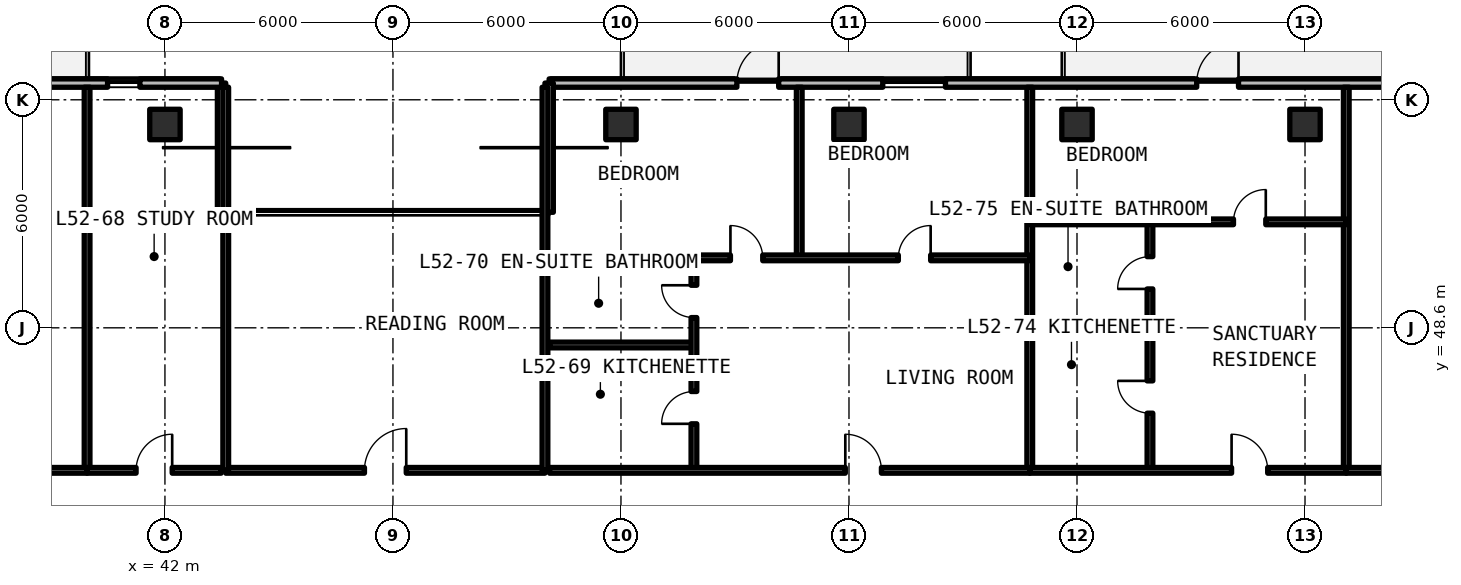
"""IFC4 building model, lengths in metres.
Left out: names, types, materials, properties, quantities, classifications, styles, units other than length and angle.
Written with IfcOpenShell. Run it as: python <this file> out.ifc"""

import sys

from ifc_helpers import new_model, si_unit, direction, frame, frame_2d, origin, origin_2d, place, context, subcontext, project, spatial, rectangle, extrude, element, fill, save


model = new_model("IFC4")
c1 = context("Model", 3, precision=1e-05, world=origin(), true_north=direction((0.0, 1.0)))
c2 = subcontext(c1, "Body", "Model", "MODEL_VIEW")
j1 = project(units=[si_unit("LENGTHUNIT", "METRE"), si_unit("PLANEANGLEUNIT", "RADIAN")], contexts=[c1])
p1 = place(None, origin())
s1 = spatial("IfcSite", under=j1, at=p1, CompositionType="ELEMENT")
p2 = place(p1, origin())
s2 = spatial("IfcBuilding", under=s1, at=p2, CompositionType="ELEMENT")
p3 = place(p2, frame((0.0, 0.0, 188.43)))
s3 = spatial("IfcBuildingStorey", under=s2, at=p3, CompositionType="ELEMENT", Elevation=188.43)
for number, where, z_axis, x_axis in (
    (1, (42.0, 53.95, 0.0), (0.0, 0.0, 1.0), (1.0, 0.0, 0.0)),
    (2, (54.0, 53.95, 0.0), (0.0, 0.0, 1.0), (1.0, 0.0, 0.0)),
    (3, (60.0, 53.95, 0.0), (0.0, 0.0, 1.0), (1.0, 0.0, 0.0)),
    (4, (66.0, 53.95, 0.0), (0.0, 0.0, 1.0), (1.0, 0.0, 0.0)),
    (5, (72.0, 53.95, 0.0), (0.0, 0.0, 1.0), (1.0, 0.0, 0.0)),
):
    element("IfcColumn", number, at=place(p3, frame(where, z_axis=z_axis, x_axis=x_axis)), inside=s3, PredefinedType="COLUMN", context=c2, shape_type="SweptSolid", body=[
        extrude(rectangle(XDim=0.8, YDim=0.8, at=origin_2d()), origin(), (0.0, 0.0, 1.0), 3.3),
    ])
p4 = place(p3, frame((95.354, 55.04, 0.0), z_axis=(0.0, 0.0, 1.0), x_axis=(-1.0, 0.0, 0.0)))
e6 = element("IfcWall", 6, at=p4, inside=s3, PredefinedType="SOLIDWALL", context=c2, shape_type="SweptSolid", body=[
    extrude(rectangle(XDim=43.244, YDim=0.22, at=frame_2d((21.622, 0.0))), origin(), (0.0, 0.0, 1.0), 3.08),
])
p5 = place(p4, frame((37.204, 0.0, 0.0)))
e7 = element("IfcOpeningElement", 7, at=p5, cuts=e6, PredefinedType="OPENING", context=c2, shape_type="SweptSolid", body=[
    extrude(rectangle(XDim=1.1, YDim=2.15, at=frame_2d((0.55, 1.075))), frame((0.0, 0.12, 0.0), z_axis=(0.0, -1.0, 0.0), x_axis=(1.0, 0.0, 0.0)), (0.0, 0.0, 1.0), 0.24),
])
p6 = place(p4, frame((25.104, 0.0, 0.0)))
e8 = element("IfcOpeningElement", 8, at=p6, cuts=e6, PredefinedType="OPENING", context=c2, shape_type="SweptSolid", body=[
    extrude(rectangle(XDim=1.1, YDim=2.15, at=frame_2d((0.55, 1.075))), frame((0.0, 0.12, 0.0), z_axis=(0.0, -1.0, 0.0), x_axis=(1.0, 0.0, 0.0)), (0.0, 0.0, 1.0), 0.24),
])
p7 = place(p4, frame((13.254, 0.0, 0.0)))
e9 = element("IfcOpeningElement", 9, at=p7, cuts=e6, PredefinedType="OPENING", context=c2, shape_type="SweptSolid", body=[
    extrude(rectangle(XDim=1.1, YDim=2.15, at=frame_2d((0.55, 1.075))), frame((0.0, 0.12, 0.0), z_axis=(0.0, -1.0, 0.0), x_axis=(1.0, 0.0, 0.0)), (0.0, 0.0, 1.0), 0.24),
])
p8 = place(p4, frame((32.815, 0.0, 0.78)))
e10 = element("IfcOpeningElement", 10, at=p8, cuts=e6, PredefinedType="OPENING", context=c2, shape_type="SweptSolid", body=[
    extrude(rectangle(XDim=1.65, YDim=1.66, at=frame_2d((0.825, 0.83))), frame((0.0, 0.12, 0.0), z_axis=(0.0, -1.0, 0.0), x_axis=(1.0, 0.0, 0.0)), (0.0, 0.0, 1.0), 0.24),
])
p9 = place(p4, frame((8.458, 0.0, 0.78)))
e11 = element("IfcOpeningElement", 11, at=p9, cuts=e6, PredefinedType="OPENING", context=c2, shape_type="SweptSolid", body=[
    extrude(rectangle(XDim=1.65, YDim=1.66, at=frame_2d((0.825, 0.83))), frame((0.0, 0.12, 0.0), z_axis=(0.0, -1.0, 0.0), x_axis=(1.0, 0.0, 0.0)), (0.0, 0.0, 1.0), 0.24),
])
p10 = place(p4, frame((2.303, 0.0, 0.78)))
e12 = element("IfcOpeningElement", 12, at=p10, cuts=e6, PredefinedType="OPENING", context=c2, shape_type="SweptSolid", body=[
    extrude(rectangle(XDim=1.65, YDim=1.66, at=frame_2d((0.825, 0.83))), frame((0.0, 0.12, 0.0), z_axis=(0.0, -1.0, 0.0), x_axis=(1.0, 0.0, 0.0)), (0.0, 0.0, 1.0), 0.24),
])
for number, where, z_axis, x_axis in (
    (13, (52.11, 55.04, 0.0), (0.0, 0.0, 1.0), (0.0, -1.0, 0.0)),
    (14, (43.49, 51.64, 0.0), (0.0, 0.0, 1.0), (0.0, 1.0, 0.0)),
):
    element("IfcWall", number, at=place(p3, frame(where, z_axis=z_axis, x_axis=x_axis)), inside=s3, PredefinedType="SOLIDWALL", context=c2, shape_type="SweptSolid", body=[
        extrude(rectangle(XDim=3.4, YDim=0.22, at=frame_2d((1.7, 0.0))), origin(), (0.0, 0.0, 1.0), 3.08),
    ])
p11 = place(p3, frame((43.49, 55.04, 0.0), z_axis=(0.0, 0.0, 1.0), x_axis=(-1.0, 0.0, 0.0)))
e15 = element("IfcWall", 15, at=p11, inside=s3, PredefinedType="SOLIDWALL", context=c2, shape_type="SweptSolid", body=[
    extrude(rectangle(XDim=17.644, YDim=0.22, at=frame_2d((8.822, 0.0))), origin(), (0.0, 0.0, 1.0), 3.08),
])
p12 = place(p11, frame((10.29, 0.0, 0.0)))
e16 = element("IfcOpeningElement", 16, at=p12, cuts=e15, PredefinedType="OPENING", context=c2, shape_type="SweptSolid", body=[
    extrude(rectangle(XDim=1.1, YDim=2.15, at=frame_2d((0.55, 1.075))), frame((0.0, 0.12, 0.0), z_axis=(0.0, -1.0, 0.0), x_axis=(1.0, 0.0, 0.0)), (0.0, 0.0, 1.0), 0.24),
])
p13 = place(p11, frame((14.901, 0.0, 0.78)))
e17 = element("IfcOpeningElement", 17, at=p13, cuts=e15, PredefinedType="OPENING", context=c2, shape_type="SweptSolid", body=[
    extrude(rectangle(XDim=1.65, YDim=1.66, at=frame_2d((0.825, 0.83))), frame((0.0, 0.12, 0.0), z_axis=(0.0, -1.0, 0.0), x_axis=(1.0, 0.0, 0.0)), (0.0, 0.0, 1.0), 0.24),
])
p14 = place(p11, frame((4.969, 0.0, 0.78)))
e18 = element("IfcOpeningElement", 18, at=p14, cuts=e15, PredefinedType="OPENING", context=c2, shape_type="SweptSolid", body=[
    extrude(rectangle(XDim=1.65, YDim=1.66, at=frame_2d((0.825, 0.83))), frame((0.0, 0.12, 0.0), z_axis=(0.0, -1.0, 0.0), x_axis=(1.0, 0.0, 0.0)), (0.0, 0.0, 1.0), 0.24),
])
p15 = place(p11, frame((2.149, 0.0, 0.78)))
e19 = element("IfcOpeningElement", 19, at=p15, cuts=e15, PredefinedType="OPENING", context=c2, shape_type="SweptSolid", body=[
    extrude(rectangle(XDim=0.85, YDim=1.65, at=frame_2d((0.425, 0.825))), frame((0.0, 0.12, 0.0), z_axis=(0.0, -1.0, 0.0), x_axis=(1.0, 0.0, 0.0)), (0.0, 0.0, 1.0), 0.24),
])
p16 = place(p3, frame((43.6, 44.85, 0.0), z_axis=(0.0, 0.0, 1.0), x_axis=(1.0, 0.0, 0.0)))
e20 = element("IfcWall", 20, at=p16, inside=s3, PredefinedType="SOLIDWALL", context=c2, shape_type="SweptSolid", body=[
    extrude(rectangle(XDim=8.4, YDim=0.15, at=frame_2d((4.2, 0.0))), origin(), (0.0, 0.0, 1.0), 2.35),
])
p17 = place(p16, frame((3.65, 0.0, 0.0)))
e21 = element("IfcOpeningElement", 21, at=p17, cuts=e20, PredefinedType="OPENING", context=c2, shape_type="SweptSolid", body=[
    extrude(rectangle(XDim=1.1, YDim=2.15, at=frame_2d((0.55, 1.075))), frame((0.0, 0.085, 0.0), z_axis=(0.0, -1.0, 0.0), x_axis=(1.0, 0.0, 0.0)), (0.0, 0.0, 1.0), 0.17),
])
for number, where, z_axis, x_axis in (
    (22, (43.6, 44.85, 0.0), (0.0, 0.0, 1.0), (0.0, 1.0, 0.0)),
    (23, (52.0, 44.85, 0.0), (0.0, 0.0, 1.0), (0.0, 1.0, 0.0)),
    (24, (39.951, 44.85, 0.0), (0.0, 0.0, 1.0), (0.0, 1.0, 0.0)),
):
    element("IfcWall", number, at=place(p3, frame(where, z_axis=z_axis, x_axis=x_axis)), inside=s3, PredefinedType="SOLIDWALL", context=c2, shape_type="SweptSolid", body=[
        extrude(rectangle(XDim=10.08, YDim=0.15, at=frame_2d((5.04, 0.0))), origin(), (0.0, 0.0, 1.0), 2.35),
    ])
p18 = place(p3, frame((33.842, 44.85, 0.0), z_axis=(0.0, 0.0, 1.0), x_axis=(1.0, 0.0, 0.0)))
e25 = element("IfcWall", 25, at=p18, inside=s3, PredefinedType="SOLIDWALL", context=c2, shape_type="SweptSolid", body=[
    extrude(rectangle(XDim=6.11, YDim=0.15, at=frame_2d((3.055, 0.0))), origin(), (0.0, 0.0, 1.0), 2.35),
])
p19 = place(p18, frame((2.58, 0.0, 0.0)))
e26 = element("IfcOpeningElement", 26, at=p19, cuts=e25, PredefinedType="OPENING", context=c2, shape_type="SweptSolid", body=[
    extrude(rectangle(XDim=0.95, YDim=2.15, at=frame_2d((0.475, 1.075))), frame((0.0, 0.085, 0.0), z_axis=(0.0, -1.0, 0.0), x_axis=(1.0, 0.0, 0.0)), (0.0, 0.0, 1.0), 0.17),
])
p20 = place(p3, frame((39.951, 44.85, 0.0), z_axis=(0.0, 0.0, 1.0), x_axis=(1.0, 0.0, 0.0)))
e27 = element("IfcWall", 27, at=p20, inside=s3, PredefinedType="SOLIDWALL", context=c2, shape_type="SweptSolid", body=[
    extrude(rectangle(XDim=3.529, YDim=0.15, at=frame_2d((1.764, 0.0))), origin(), (0.0, 0.0, 1.0), 2.35),
])
p21 = place(p20, frame((1.289, 0.0, 0.0)))
e28 = element("IfcOpeningElement", 28, at=p21, cuts=e27, PredefinedType="OPENING", context=c2, shape_type="SweptSolid", body=[
    extrude(rectangle(XDim=0.95, YDim=2.15, at=frame_2d((0.475, 1.075))), frame((0.0, 0.085, 0.0), z_axis=(0.0, -1.0, 0.0), x_axis=(1.0, 0.0, 0.0)), (0.0, 0.0, 1.0), 0.17),
])
p22 = place(p3, frame((64.757, 44.85, 0.0), z_axis=(0.0, 0.0, 1.0), x_axis=(0.0, 1.0, 0.0)))
e29 = element("IfcWall", 29, at=p22, inside=s3, PredefinedType="SOLIDWALL", context=c2, shape_type="SweptSolid", body=[
    extrude(rectangle(XDim=10.08, YDim=0.15, at=frame_2d((5.04, 0.0))), origin(), (0.0, 0.0, 1.0), 2.35),
])
p23 = place(p3, frame((52.12, 48.148, 0.0), z_axis=(0.0, 0.0, 1.0), x_axis=(1.0, 0.0, 0.0)))
e30 = element("IfcWall", 30, at=p23, inside=s3, PredefinedType="PARTITIONING", context=c2, shape_type="SweptSolid", body=[
    extrude(rectangle(XDim=3.8, YDim=0.15, at=frame_2d((1.9, 0.0))), origin(), (0.0, 0.0, 1.0), 2.35),
])
p24 = place(p3, frame((55.92, 44.85, 0.0), z_axis=(0.0, 0.0, 1.0), x_axis=(0.0, 1.0, 0.0)))
e31 = element("IfcWall", 31, at=p24, inside=s3, PredefinedType="PARTITIONING", context=c2, shape_type="SweptSolid", body=[
    extrude(rectangle(XDim=5.591, YDim=0.15, at=frame_2d((2.795, 0.0))), origin(), (0.0, 0.0, 1.0), 2.35),
])
p25 = place(p24, frame((1.224, 0.0, 0.0)))
e32 = element("IfcOpeningElement", 32, at=p25, cuts=e31, PredefinedType="OPENING", context=c2, shape_type="SweptSolid", body=[
    extrude(rectangle(XDim=0.85, YDim=2.1, at=frame_2d((0.425, 1.05))), frame((0.0, 0.085, 0.0), z_axis=(0.0, -1.0, 0.0), x_axis=(1.0, 0.0, 0.0)), (0.0, 0.0, 1.0), 0.17),
])
p26 = place(p24, frame((4.02, 0.0, 0.0)))
e33 = element("IfcOpeningElement", 33, at=p26, cuts=e31, PredefinedType="OPENING", context=c2, shape_type="SweptSolid", body=[
    extrude(rectangle(XDim=0.85, YDim=2.1, at=frame_2d((0.425, 1.05))), frame((0.0, 0.085, 0.0), z_axis=(0.0, -1.0, 0.0), x_axis=(1.0, 0.0, 0.0)), (0.0, 0.0, 1.0), 0.17),
])
p27 = place(p3, frame((58.691, 50.441, 0.0), z_axis=(0.0, 0.0, 1.0), x_axis=(0.0, 1.0, 0.0)))
e34 = element("IfcWall", 34, at=p27, inside=s3, PredefinedType="PARTITIONING", context=c2, shape_type="SweptSolid", body=[
    extrude(rectangle(XDim=4.489, YDim=0.15, at=frame_2d((2.245, 0.0))), origin(), (0.0, 0.0, 1.0), 2.35),
])
p28 = place(p3, frame((52.12, 50.441, 0.0), z_axis=(0.0, 0.0, 1.0), x_axis=(1.0, 0.0, 0.0)))
e35 = element("IfcWall", 35, at=p28, inside=s3, PredefinedType="PARTITIONING", context=c2, shape_type="SweptSolid", body=[
    extrude(rectangle(XDim=12.637, YDim=0.15, at=frame_2d((6.318, 0.0))), origin(), (0.0, 0.0, 1.0), 2.35),
])
p29 = place(p28, frame((4.76, 0.0, 0.0)))
e36 = element("IfcOpeningElement", 36, at=p29, cuts=e35, PredefinedType="OPENING", context=c2, shape_type="SweptSolid", body=[
    extrude(rectangle(XDim=0.85, YDim=2.1, at=frame_2d((0.425, 1.05))), frame((0.0, 0.085, 0.0), z_axis=(0.0, -1.0, 0.0), x_axis=(1.0, 0.0, 0.0)), (0.0, 0.0, 1.0), 0.17),
])
p30 = place(p28, frame((9.179, 0.0, 0.0)))
e37 = element("IfcOpeningElement", 37, at=p30, cuts=e35, PredefinedType="OPENING", context=c2, shape_type="SweptSolid", body=[
    extrude(rectangle(XDim=0.85, YDim=2.1, at=frame_2d((0.425, 1.05))), frame((0.0, 0.085, 0.0), z_axis=(0.0, -1.0, 0.0), x_axis=(1.0, 0.0, 0.0)), (0.0, 0.0, 1.0), 0.17),
])
p31 = place(p3, frame((52.12, 44.85, 0.0), z_axis=(0.0, 0.0, 1.0), x_axis=(1.0, 0.0, 0.0)))
e38 = element("IfcWall", 38, at=p31, inside=s3, PredefinedType="SOLIDWALL", context=c2, shape_type="SweptSolid", body=[
    extrude(rectangle(XDim=12.637, YDim=0.15, at=frame_2d((6.318, 0.0))), origin(), (0.0, 0.0, 1.0), 2.35),
])
p32 = place(p31, frame((7.783, 0.0, 0.0)))
e39 = element("IfcOpeningElement", 39, at=p32, cuts=e38, PredefinedType="OPENING", context=c2, shape_type="SweptSolid", body=[
    extrude(rectangle(XDim=0.95, YDim=2.15, at=frame_2d((0.475, 1.075))), frame((0.0, 0.085, 0.0), z_axis=(0.0, -1.0, 0.0), x_axis=(1.0, 0.0, 0.0)), (0.0, 0.0, 1.0), 0.17),
])
p33 = place(p3, frame((73.086, 44.85, 0.0), z_axis=(0.0, 0.0, 1.0), x_axis=(0.0, 1.0, 0.0)))
e40 = element("IfcWall", 40, at=p33, inside=s3, PredefinedType="SOLIDWALL", context=c2, shape_type="SweptSolid", body=[
    extrude(rectangle(XDim=10.08, YDim=0.15, at=frame_2d((5.04, 0.0))), origin(), (0.0, 0.0, 1.0), 2.35),
])
p34 = place(p3, frame((64.757, 48.708, 0.0), z_axis=(0.0, 0.0, 1.0), x_axis=(1.0, 0.0, 0.0)))
e41 = element("IfcWall", 41, at=p34, inside=s3, PredefinedType="PARTITIONING", context=c2, shape_type="SweptSolid", body=[
    extrude(rectangle(XDim=3.163, YDim=0.15, at=frame_2d((1.582, 0.0))), origin(), (0.0, 0.0, 1.0), 2.35),
])
p35 = place(p3, frame((67.92, 44.85, 0.0), z_axis=(0.0, 0.0, 1.0), x_axis=(0.0, 1.0, 0.0)))
e42 = element("IfcWall", 42, at=p35, inside=s3, PredefinedType="PARTITIONING", context=c2, shape_type="SweptSolid", body=[
    extrude(rectangle(XDim=6.538, YDim=0.15, at=frame_2d((3.269, 0.0))), origin(), (0.0, 0.0, 1.0), 2.35),
])
p36 = place(p35, frame((1.504, 0.0, 0.0)))
e43 = element("IfcOpeningElement", 43, at=p36, cuts=e42, PredefinedType="OPENING", context=c2, shape_type="SweptSolid", body=[
    extrude(rectangle(XDim=0.85, YDim=2.1, at=frame_2d((0.425, 1.05))), frame((0.0, 0.085, 0.0), z_axis=(0.0, -1.0, 0.0), x_axis=(1.0, 0.0, 0.0)), (0.0, 0.0, 1.0), 0.17),
])
p37 = place(p35, frame((4.773, 0.0, 0.0)))
e44 = element("IfcOpeningElement", 44, at=p37, cuts=e42, PredefinedType="OPENING", context=c2, shape_type="SweptSolid", body=[
    extrude(rectangle(XDim=0.85, YDim=2.1, at=frame_2d((0.425, 1.05))), frame((0.0, 0.085, 0.0), z_axis=(0.0, -1.0, 0.0), x_axis=(1.0, 0.0, 0.0)), (0.0, 0.0, 1.0), 0.17),
])
p38 = place(p3, frame((64.757, 51.388, 0.0), z_axis=(0.0, 0.0, 1.0), x_axis=(1.0, 0.0, 0.0)))
e45 = element("IfcWall", 45, at=p38, inside=s3, PredefinedType="PARTITIONING", context=c2, shape_type="SweptSolid", body=[
    extrude(rectangle(XDim=8.329, YDim=0.15, at=frame_2d((4.165, 0.0))), origin(), (0.0, 0.0, 1.0), 2.35),
])
p39 = place(p38, frame((5.361, 0.0, 0.0)))
e46 = element("IfcOpeningElement", 46, at=p39, cuts=e45, PredefinedType="OPENING", context=c2, shape_type="SweptSolid", body=[
    extrude(rectangle(XDim=0.85, YDim=2.1, at=frame_2d((0.425, 1.05))), frame((0.0, 0.085, 0.0), z_axis=(0.0, -1.0, 0.0), x_axis=(1.0, 0.0, 0.0)), (0.0, 0.0, 1.0), 0.17),
])
p40 = place(p3, frame((64.757, 44.85, 0.0), z_axis=(0.0, 0.0, 1.0), x_axis=(1.0, 0.0, 0.0)))
e47 = element("IfcWall", 47, at=p40, inside=s3, PredefinedType="SOLIDWALL", context=c2, shape_type="SweptSolid", body=[
    extrude(rectangle(XDim=8.329, YDim=0.15, at=frame_2d((4.165, 0.0))), origin(), (0.0, 0.0, 1.0), 2.35),
])
p41 = place(p40, frame((5.311, 0.0, 0.0)))
e48 = element("IfcOpeningElement", 48, at=p41, cuts=e47, PredefinedType="OPENING", context=c2, shape_type="SweptSolid", body=[
    extrude(rectangle(XDim=0.95, YDim=2.15, at=frame_2d((0.475, 1.075))), frame((0.0, 0.085, 0.0), z_axis=(0.0, -1.0, 0.0), x_axis=(1.0, 0.0, 0.0)), (0.0, 0.0, 1.0), 0.17),
])
p42 = place(p3, frame((73.086, 44.85, 0.0), z_axis=(0.0, 0.0, 1.0), x_axis=(1.0, 0.0, 0.0)))
e49 = element("IfcWall", 49, at=p42, inside=s3, PredefinedType="SOLIDWALL", context=c2, shape_type="SweptSolid", body=[
    extrude(rectangle(XDim=9.765, YDim=0.15, at=frame_2d((4.882, 0.0))), origin(), (0.0, 0.0, 1.0), 2.35),
])
p43 = place(p42, frame((4.333, 0.0, 0.0)))
e50 = element("IfcOpeningElement", 50, at=p43, cuts=e49, PredefinedType="OPENING", context=c2, shape_type="SweptSolid", body=[
    extrude(rectangle(XDim=1.1, YDim=2.15, at=frame_2d((0.55, 1.075))), frame((0.0, 0.085, 0.0), z_axis=(0.0, -1.0, 0.0), x_axis=(1.0, 0.0, 0.0)), (0.0, 0.0, 1.0), 0.17),
])
p44 = place(p5, frame((1.1, 0.0, 0.0), z_axis=(0.0, 0.0, 1.0), x_axis=(-1.0, 0.0, 0.0)))
e51 = element("IfcDoor", 51, at=p44, inside=s3, OperationType="SINGLE_SWING_RIGHT", PredefinedType="DOOR", context=c2, shape_type="SweptSolid", body=[
    extrude(rectangle(XDim=1.1, YDim=2.15, at=frame_2d((0.55, 1.075))), frame((0.0, 0.025, 0.0), z_axis=(0.0, -1.0, 0.0), x_axis=(1.0, 0.0, 0.0)), (0.0, 0.0, 1.0), 0.05),
])
fill(e7, e51)
p45 = place(p6, frame((1.1, 0.0, 0.0), z_axis=(0.0, 0.0, 1.0), x_axis=(-1.0, 0.0, 0.0)))
e52 = element("IfcDoor", 52, at=p45, inside=s3, OperationType="SINGLE_SWING_LEFT", PredefinedType="DOOR", context=c2, shape_type="SweptSolid", body=[
    extrude(rectangle(XDim=1.1, YDim=2.15, at=frame_2d((0.55, 1.075))), frame((0.0, 0.025, 0.0), z_axis=(0.0, -1.0, 0.0), x_axis=(1.0, 0.0, 0.0)), (0.0, 0.0, 1.0), 0.05),
])
fill(e8, e52)
p46 = place(p8, origin())
e53 = element("IfcWindow", 53, at=p46, inside=s3, PartitioningType="SINGLE_PANEL", PredefinedType="WINDOW", context=c2, shape_type="SweptSolid", body=[
    extrude(rectangle(XDim=1.65, YDim=1.66, at=frame_2d((0.825, 0.83))), frame((0.0, 0.03, 0.0), z_axis=(0.0, -1.0, 0.0), x_axis=(1.0, 0.0, 0.0)), (0.0, 0.0, 1.0), 0.06),
])
fill(e10, e53)
p47 = place(p15, origin())
e54 = element("IfcWindow", 54, at=p47, inside=s3, PartitioningType="SINGLE_PANEL", PredefinedType="WINDOW", context=c2, shape_type="SweptSolid", body=[
    extrude(rectangle(XDim=0.85, YDim=1.65, at=frame_2d((0.425, 0.825))), frame((0.0, 0.03, 0.0), z_axis=(0.0, -1.0, 0.0), x_axis=(1.0, 0.0, 0.0)), (0.0, 0.0, 1.0), 0.06),
])
fill(e19, e54)
p48 = place(p17, origin())
e55 = element("IfcDoor", 55, at=p48, inside=s3, OperationType="SINGLE_SWING_RIGHT", PredefinedType="DOOR", context=c2, shape_type="SweptSolid", body=[
    extrude(rectangle(XDim=1.1, YDim=2.15, at=frame_2d((0.55, 1.075))), frame((0.0, 0.025, 0.0), z_axis=(0.0, -1.0, 0.0), x_axis=(1.0, 0.0, 0.0)), (0.0, 0.0, 1.0), 0.05),
])
fill(e21, e55)
p49 = place(p21, origin())
e56 = element("IfcDoor", 56, at=p49, inside=s3, OperationType="SINGLE_SWING_RIGHT", PredefinedType="DOOR", context=c2, shape_type="SweptSolid", body=[
    extrude(rectangle(XDim=0.95, YDim=2.15, at=frame_2d((0.475, 1.075))), frame((0.0, 0.025, 0.0), z_axis=(0.0, -1.0, 0.0), x_axis=(1.0, 0.0, 0.0)), (0.0, 0.0, 1.0), 0.05),
])
fill(e28, e56)
p50 = place(p25, origin())
e57 = element("IfcDoor", 57, at=p50, inside=s3, OperationType="SINGLE_SWING_LEFT", PredefinedType="DOOR", context=c2, shape_type="SweptSolid", body=[
    extrude(rectangle(XDim=0.85, YDim=2.1, at=frame_2d((0.425, 1.05))), frame((0.0, 0.025, 0.0), z_axis=(0.0, -1.0, 0.0), x_axis=(1.0, 0.0, 0.0)), (0.0, 0.0, 1.0), 0.05),
])
fill(e32, e57)
p51 = place(p26, origin())
e58 = element("IfcDoor", 58, at=p51, inside=s3, OperationType="SINGLE_SWING_RIGHT", PredefinedType="DOOR", context=c2, shape_type="SweptSolid", body=[
    extrude(rectangle(XDim=0.85, YDim=2.1, at=frame_2d((0.425, 1.05))), frame((0.0, 0.025, 0.0), z_axis=(0.0, -1.0, 0.0), x_axis=(1.0, 0.0, 0.0)), (0.0, 0.0, 1.0), 0.05),
])
fill(e33, e58)
p52 = place(p29, origin())
e59 = element("IfcDoor", 59, at=p52, inside=s3, OperationType="SINGLE_SWING_LEFT", PredefinedType="DOOR", context=c2, shape_type="SweptSolid", body=[
    extrude(rectangle(XDim=0.85, YDim=2.1, at=frame_2d((0.425, 1.05))), frame((0.0, 0.025, 0.0), z_axis=(0.0, -1.0, 0.0), x_axis=(1.0, 0.0, 0.0)), (0.0, 0.0, 1.0), 0.05),
])
fill(e36, e59)
p53 = place(p30, origin())
e60 = element("IfcDoor", 60, at=p53, inside=s3, OperationType="SINGLE_SWING_RIGHT", PredefinedType="DOOR", context=c2, shape_type="SweptSolid", body=[
    extrude(rectangle(XDim=0.85, YDim=2.1, at=frame_2d((0.425, 1.05))), frame((0.0, 0.025, 0.0), z_axis=(0.0, -1.0, 0.0), x_axis=(1.0, 0.0, 0.0)), (0.0, 0.0, 1.0), 0.05),
])
fill(e37, e60)
p54 = place(p32, origin())
e61 = element("IfcDoor", 61, at=p54, inside=s3, OperationType="SINGLE_SWING_LEFT", PredefinedType="DOOR", context=c2, shape_type="SweptSolid", body=[
    extrude(rectangle(XDim=0.95, YDim=2.15, at=frame_2d((0.475, 1.075))), frame((0.0, 0.025, 0.0), z_axis=(0.0, -1.0, 0.0), x_axis=(1.0, 0.0, 0.0)), (0.0, 0.0, 1.0), 0.05),
])
fill(e39, e61)
p55 = place(p36, origin())
e62 = element("IfcDoor", 62, at=p55, inside=s3, OperationType="SINGLE_SWING_RIGHT", PredefinedType="DOOR", context=c2, shape_type="SweptSolid", body=[
    extrude(rectangle(XDim=0.85, YDim=2.1, at=frame_2d((0.425, 1.05))), frame((0.0, 0.025, 0.0), z_axis=(0.0, -1.0, 0.0), x_axis=(1.0, 0.0, 0.0)), (0.0, 0.0, 1.0), 0.05),
])
fill(e43, e62)
p56 = place(p37, origin())
e63 = element("IfcDoor", 63, at=p56, inside=s3, OperationType="SINGLE_SWING_LEFT", PredefinedType="DOOR", context=c2, shape_type="SweptSolid", body=[
    extrude(rectangle(XDim=0.85, YDim=2.1, at=frame_2d((0.425, 1.05))), frame((0.0, 0.025, 0.0), z_axis=(0.0, -1.0, 0.0), x_axis=(1.0, 0.0, 0.0)), (0.0, 0.0, 1.0), 0.05),
])
fill(e44, e63)
p57 = place(p39, origin())
e64 = element("IfcDoor", 64, at=p57, inside=s3, OperationType="SINGLE_SWING_RIGHT", PredefinedType="DOOR", context=c2, shape_type="SweptSolid", body=[
    extrude(rectangle(XDim=0.85, YDim=2.1, at=frame_2d((0.425, 1.05))), frame((0.0, 0.025, 0.0), z_axis=(0.0, -1.0, 0.0), x_axis=(1.0, 0.0, 0.0)), (0.0, 0.0, 1.0), 0.05),
])
fill(e46, e64)
p58 = place(p41, origin())
e65 = element("IfcDoor", 65, at=p58, inside=s3, OperationType="SINGLE_SWING_LEFT", PredefinedType="DOOR", context=c2, shape_type="SweptSolid", body=[
    extrude(rectangle(XDim=0.95, YDim=2.15, at=frame_2d((0.475, 1.075))), frame((0.0, 0.025, 0.0), z_axis=(0.0, -1.0, 0.0), x_axis=(1.0, 0.0, 0.0)), (0.0, 0.0, 1.0), 0.05),
])
fill(e48, e65)
save(model, sys.argv[1])
